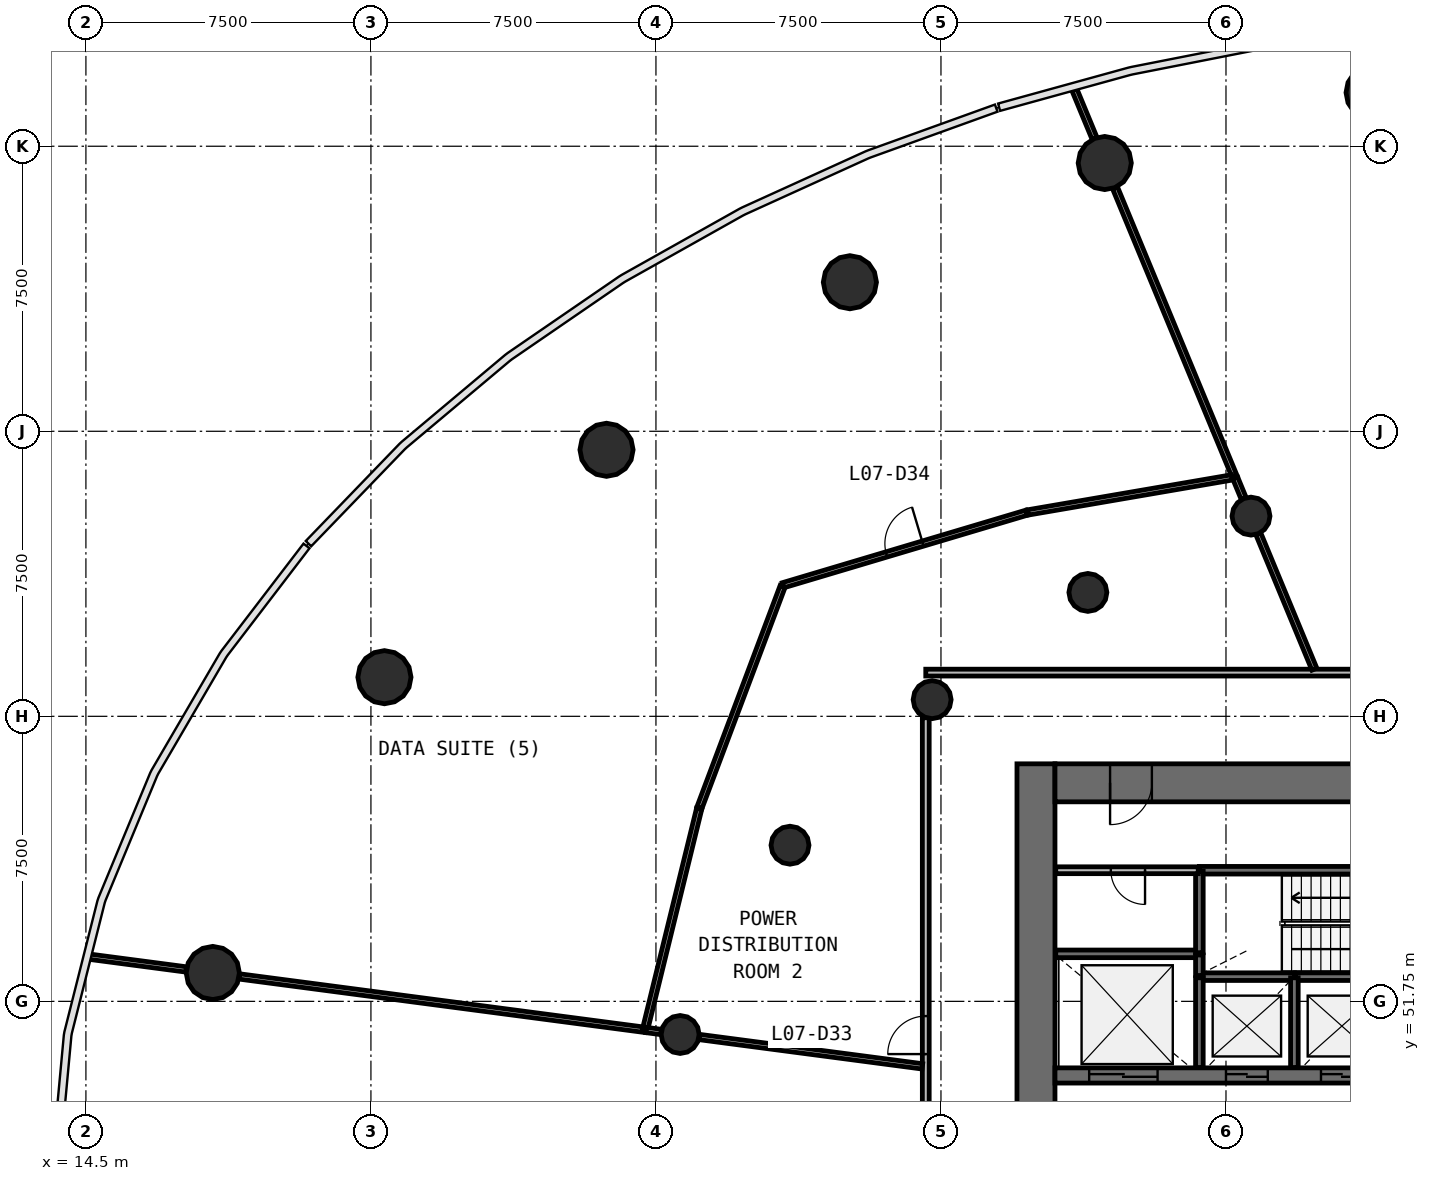
"""IFC4 building model, lengths in metres.
Left out: names, types, materials, properties, quantities, classifications, styles, units other than length and angle.
Written with IfcOpenShell. Run it as: python <this file> out.ifc"""

import sys

from ifc_helpers import new_model, si_unit, direction, frame, frame_2d, origin, origin_2d, place, context, subcontext, project, spatial, rectangle, circle, extrude, source, transform, mapped, element, fill, save


model = new_model("IFC4")
c1 = context("Model", 3, precision=1e-05, world=origin(), true_north=direction((0.0, 1.0)))
c2 = subcontext(c1, "Body", "Model", "MODEL_VIEW")
j1 = project(units=[si_unit("LENGTHUNIT", "METRE"), si_unit("PLANEANGLEUNIT", "RADIAN")], contexts=[c1])
p1 = place(None, origin())
s1 = spatial("IfcSite", under=j1, at=p1, CompositionType="ELEMENT")
p2 = place(p1, origin())
s2 = spatial("IfcBuilding", under=s1, at=p2, CompositionType="ELEMENT")
p3 = place(p2, frame((0.0, 0.0, 31.4)))
s3 = spatial("IfcBuildingStorey", under=s2, at=p3, CompositionType="ELEMENT", Elevation=31.4)
p4 = place(p3, frame((39.5, 58.0, 0.0), z_axis=(0.0, 0.0, 1.0), x_axis=(0.0, -1.0, 0.0)))
e1 = element("IfcWall", 1, at=p4, inside=s3, PredefinedType="SHEAR", context=c2, shape_type="SweptSolid", body=[
    extrude(rectangle(XDim=20.0, YDim=1.0, at=frame_2d((10.0, 0.0))), origin(), (0.0, 0.0, 1.0), 4.4),
])
p5 = place(p4, frame((9.1, 0.0, 0.0)))
e2 = element("IfcOpeningElement", 2, at=p5, cuts=e1, PredefinedType="OPENING", context=c2, shape_type="SweptSolid", body=[
    extrude(rectangle(XDim=1.8, YDim=2.1, at=frame_2d((0.9, 1.05))), frame((0.0, 0.51, 0.0), z_axis=(0.0, -1.0, 0.0), x_axis=(1.0, 0.0, 0.0)), (0.0, 0.0, 1.0), 1.02),
])
p6 = place(p3, frame((64.0, 57.5, 0.0), z_axis=(0.0, 0.0, 1.0), x_axis=(-1.0, 0.0, 0.0)))
e3 = element("IfcWall", 3, at=p6, inside=s3, PredefinedType="SHEAR", context=c2, shape_type="SweptSolid", body=[
    extrude(rectangle(XDim=24.0, YDim=1.0, at=frame_2d((12.0, 0.0))), origin(), (0.0, 0.0, 1.0), 4.4),
])
p7 = place(p6, frame((21.45, 0.0, 0.0)))
e4 = element("IfcOpeningElement", 4, at=p7, cuts=e3, PredefinedType="OPENING", context=c2, shape_type="SweptSolid", body=[
    extrude(rectangle(XDim=1.1, YDim=2.1, at=frame_2d((0.55, 1.05))), frame((0.0, 0.51, 0.0), z_axis=(0.0, -1.0, 0.0), x_axis=(1.0, 0.0, 0.0)), (0.0, 0.0, 1.0), 1.02),
])
p8 = place(p6, frame((1.95, 0.0, 0.0)))
e5 = element("IfcOpeningElement", 5, at=p8, cuts=e3, PredefinedType="OPENING", context=c2, shape_type="SweptSolid", body=[
    extrude(rectangle(XDim=1.1, YDim=2.1, at=frame_2d((0.55, 1.05))), frame((0.0, 0.51, 0.0), z_axis=(0.0, -1.0, 0.0), x_axis=(1.0, 0.0, 0.0)), (0.0, 0.0, 1.0), 1.02),
])
p9 = place(p3, frame((40.0, 49.8, 0.0), z_axis=(0.0, 0.0, 1.0), x_axis=(1.0, 0.0, 0.0)))
e6 = element("IfcWall", 6, at=p9, inside=s3, PredefinedType="SHEAR", context=c2, shape_type="SweptSolid", body=[
    extrude(rectangle(XDim=24.0, YDim=0.4, at=frame_2d((12.0, 0.0))), origin(), (0.0, 0.0, 1.0), 4.4),
])
p10 = place(p9, frame((4.5, 0.0, 0.0)))
e7 = element("IfcOpeningElement", 7, at=p10, cuts=e6, PredefinedType="OPENING", context=c2, shape_type="SweptSolid", body=[
    extrude(rectangle(XDim=1.1, YDim=2.1, at=frame_2d((0.55, 1.05))), frame((0.0, 0.21, 0.0), z_axis=(0.0, -1.0, 0.0), x_axis=(1.0, 0.0, 0.0)), (0.0, 0.0, 1.0), 0.42),
])
p11 = place(p9, frame((7.0, 0.0, 0.0)))
e8 = element("IfcOpeningElement", 8, at=p11, cuts=e6, PredefinedType="OPENING", context=c2, shape_type="SweptSolid", body=[
    extrude(rectangle(XDim=1.1, YDim=2.1, at=frame_2d((0.55, 1.05))), frame((0.0, 0.21, 0.0), z_axis=(0.0, -1.0, 0.0), x_axis=(1.0, 0.0, 0.0)), (0.0, 0.0, 1.0), 0.42),
])
p12 = place(p9, frame((9.5, 0.0, 0.0)))
e9 = element("IfcOpeningElement", 9, at=p12, cuts=e6, PredefinedType="OPENING", context=c2, shape_type="SweptSolid", body=[
    extrude(rectangle(XDim=1.1, YDim=2.1, at=frame_2d((0.55, 1.05))), frame((0.0, 0.21, 0.0), z_axis=(0.0, -1.0, 0.0), x_axis=(1.0, 0.0, 0.0)), (0.0, 0.0, 1.0), 0.42),
])
p13 = place(p9, frame((0.9, 0.0, 0.0)))
e10 = element("IfcOpeningElement", 10, at=p13, cuts=e6, PredefinedType="OPENING", context=c2, shape_type="SweptSolid", body=[
    extrude(rectangle(XDim=1.8, YDim=2.4, at=frame_2d((0.9, 1.2))), frame((0.0, 0.21, 0.0), z_axis=(0.0, -1.0, 0.0), x_axis=(1.0, 0.0, 0.0)), (0.0, 0.0, 1.0), 0.42),
])
p14 = place(p9, frame((20.45, 0.0, 0.0)))
e11 = element("IfcOpeningElement", 11, at=p14, cuts=e6, PredefinedType="OPENING", context=c2, shape_type="SweptSolid", body=[
    extrude(rectangle(XDim=0.9, YDim=2.1, at=frame_2d((0.45, 1.05))), frame((0.0, 0.21, 0.0), z_axis=(0.0, -1.0, 0.0), x_axis=(1.0, 0.0, 0.0)), (0.0, 0.0, 1.0), 0.42),
])
p15 = place(p9, frame((11.65, 0.0, 0.0)))
e12 = element("IfcOpeningElement", 12, at=p15, cuts=e6, PredefinedType="OPENING", context=c2, shape_type="SweptSolid", body=[
    extrude(rectangle(XDim=0.9, YDim=2.1, at=frame_2d((0.45, 1.05))), frame((0.0, 0.21, 0.0), z_axis=(0.0, -1.0, 0.0), x_axis=(1.0, 0.0, 0.0)), (0.0, 0.0, 1.0), 0.42),
])
m1 = source(origin(), c2, "Body", "SweptSolid", [
    extrude(circle(Radius=0.7, at=origin_2d()), origin(), (0.0, 0.0, 1.0), 4.4),
])
for number, where, z_axis, x_axis in (
    (13, (48.358, 75.661, 0.0), (0.0, 0.0, 1.0), (1.0, 0.0, 0.0)),
    (14, (41.31, 73.809, 0.0), (0.0, 0.0, 1.0), (1.0, 0.0, 0.0)),
    (15, (34.604, 70.672, 0.0), (0.0, 0.0, 1.0), (1.0, 0.0, 0.0)),
    (16, (28.199, 66.263, 0.0), (0.0, 0.0, 1.0), (1.0, 0.0, 0.0)),
    (17, (22.355, 60.279, 0.0), (0.0, 0.0, 1.0), (1.0, 0.0, 0.0)),
    (18, (17.839, 52.497, 0.0), (0.0, 0.0, 1.0), (1.0, 0.0, 0.0)),
):
    element("IfcColumn", number, at=place(p3, frame(where, z_axis=z_axis, x_axis=x_axis)), inside=s3, PredefinedType="COLUMN", context=c2, shape_type="MappedRepresentation", body=[
        mapped(m1, transform((0.0, 0.0, 0.0), scale=1.0)),
    ])
m2 = source(origin(), c2, "Body", "SweptSolid", [
    extrude(circle(Radius=0.5, at=origin_2d()), origin(), (0.0, 0.0, 1.0), 4.4),
])
for number, where, z_axis, x_axis in (
    (19, (45.158, 64.518, 0.0), (0.0, 0.0, 1.0), (1.0, 0.0, 0.0)),
    (20, (40.866, 62.51, 0.0), (0.0, 0.0, 1.0), (1.0, 0.0, 0.0)),
    (21, (36.768, 59.688, 0.0), (0.0, 0.0, 1.0), (1.0, 0.0, 0.0)),
    (22, (33.028, 55.859, 0.0), (0.0, 0.0, 1.0), (1.0, 0.0, 0.0)),
    (23, (30.137, 50.878, 0.0), (0.0, 0.0, 1.0), (1.0, 0.0, 0.0)),
):
    element("IfcColumn", number, at=place(p3, frame(where, z_axis=z_axis, x_axis=x_axis)), inside=s3, PredefinedType="COLUMN", context=c2, shape_type="MappedRepresentation", body=[
        mapped(m2, transform((0.0, 0.0, 0.0), scale=1.0)),
    ])
p16 = place(p3, frame((50.4, 55.2, 0.0), z_axis=(0.0, 0.0, 1.0), x_axis=(-1.0, 0.0, 0.0)))
e24 = element("IfcWall", 24, at=p16, inside=s3, PredefinedType="SOLIDWALL", context=c2, shape_type="SweptSolid", body=[
    extrude(rectangle(XDim=6.6, YDim=0.2, at=frame_2d((3.3, 0.0))), origin(), (0.0, 0.0, 1.0), 3.95),
])
p17 = place(p16, frame((0.3, 0.0, 0.0)))
e25 = element("IfcOpeningElement", 25, at=p17, cuts=e24, PredefinedType="OPENING", context=c2, shape_type="SweptSolid", body=[
    extrude(rectangle(XDim=1.2, YDim=2.1, at=frame_2d((0.6, 1.05))), frame((0.0, 0.11, 0.0), z_axis=(0.0, -1.0, 0.0), x_axis=(1.0, 0.0, 0.0)), (0.0, 0.0, 1.0), 0.22),
])
p18 = place(p3, frame((43.8, 53.0, 0.0), z_axis=(0.0, 0.0, 1.0), x_axis=(-1.0, 0.0, 0.0)))
e26 = element("IfcWall", 26, at=p18, inside=s3, PredefinedType="SOLIDWALL", context=c2, shape_type="SweptSolid", body=[
    extrude(rectangle(XDim=3.78, YDim=0.2, at=frame_2d((1.89, 0.0))), origin(), (0.0, 0.0, 1.0), 3.95),
])
p19 = place(p3, frame((46.3, 52.4, 0.0), z_axis=(0.0, 0.0, 1.0), x_axis=(-1.0, 0.0, 0.0)))
e27 = element("IfcWall", 27, at=p19, inside=s3, PredefinedType="SOLIDWALL", context=c2, shape_type="SweptSolid", body=[
    extrude(rectangle(XDim=2.5, YDim=0.2, at=frame_2d((1.25, 0.0))), origin(), (0.0, 0.0, 1.0), 3.95),
])
p20 = place(p3, frame((48.8, 52.4, 0.0), z_axis=(0.0, 0.0, 1.0), x_axis=(-1.0, 0.0, 0.0)))
e28 = element("IfcWall", 28, at=p20, inside=s3, PredefinedType="SOLIDWALL", context=c2, shape_type="SweptSolid", body=[
    extrude(rectangle(XDim=2.47, YDim=0.2, at=frame_2d((1.235, 0.0))), origin(), (0.0, 0.0, 1.0), 3.95),
])
for number, where, z_axis, x_axis in (
    (29, (43.8, 52.37, 0.0), (0.0, 0.0, 1.0), (0.0, -1.0, 0.0)),
    (30, (46.3, 50.01, 0.0), (0.0, 0.0, 1.0), (0.0, 1.0, 0.0)),
):
    element("IfcWall", number, at=place(p3, frame(where, z_axis=z_axis, x_axis=x_axis)), inside=s3, PredefinedType="SOLIDWALL", context=c2, shape_type="SweptSolid", body=[
        extrude(rectangle(XDim=2.36, YDim=0.2, at=frame_2d((1.18, 0.0))), origin(), (0.0, 0.0, 1.0), 3.95),
    ])
p21 = place(p3, frame((43.8, 55.17, 0.0), z_axis=(0.0, 0.0, 1.0), x_axis=(0.0, -1.0, 0.0)))
e31 = element("IfcWall", 31, at=p21, inside=s3, PredefinedType="SOLIDWALL", context=c2, shape_type="SweptSolid", body=[
    extrude(rectangle(XDim=2.14, YDim=0.2, at=frame_2d((1.07, 0.0))), origin(), (0.0, 0.0, 1.0), 3.95),
])
p22 = place(p3, frame((43.8, 52.43, 0.0), z_axis=(0.0, 0.0, 1.0), x_axis=(0.0, 1.0, 0.0)))
e32 = element("IfcWall", 32, at=p22, inside=s3, PredefinedType="SOLIDWALL", context=c2, shape_type="SweptSolid", body=[
    extrude(rectangle(XDim=0.54, YDim=0.2, at=frame_2d((0.27, 0.0))), origin(), (0.0, 0.0, 1.0), 3.95),
])
p23 = place(p3, frame((36.6, 60.4, 0.0), z_axis=(0.0, 0.0, 1.0), x_axis=(1.0, 0.0, 0.0)))
e33 = element("IfcWall", 33, at=p23, inside=s3, PredefinedType="PARTITIONING", context=c2, shape_type="SweptSolid", body=[
    extrude(rectangle(XDim=30.8, YDim=0.18, at=frame_2d((15.4, 0.0))), origin(), (0.0, 0.0, 1.0), 3.05),
])
p24 = place(p23, frame((20.95, 0.0, 0.0)))
e34 = element("IfcOpeningElement", 34, at=p24, cuts=e33, PredefinedType="OPENING", context=c2, shape_type="SweptSolid", body=[
    extrude(rectangle(XDim=1.0, YDim=2.1, at=frame_2d((0.5, 1.05))), frame((0.0, 0.1, 0.0), z_axis=(0.0, -1.0, 0.0), x_axis=(1.0, 0.0, 0.0)), (0.0, 0.0, 1.0), 0.2),
])
p25 = place(p23, frame((14.95, 0.0, 0.0)))
e35 = element("IfcOpeningElement", 35, at=p25, cuts=e33, PredefinedType="OPENING", context=c2, shape_type="SweptSolid", body=[
    extrude(rectangle(XDim=1.0, YDim=2.1, at=frame_2d((0.5, 1.05))), frame((0.0, 0.1, 0.0), z_axis=(0.0, -1.0, 0.0), x_axis=(1.0, 0.0, 0.0)), (0.0, 0.0, 1.0), 0.2),
])
p26 = place(p3, frame((36.6, 35.63, 0.0), z_axis=(0.0, 0.0, 1.0), x_axis=(0.0, 1.0, 0.0)))
e36 = element("IfcWall", 36, at=p26, inside=s3, PredefinedType="PARTITIONING", context=c2, shape_type="SweptSolid", body=[
    extrude(rectangle(XDim=23.583, YDim=0.18, at=frame_2d((11.791, 0.0))), origin(), (0.0, 0.0, 1.0), 3.05),
])
p27 = place(p26, frame((14.732, 0.0, 0.0)))
e37 = element("IfcOpeningElement", 37, at=p27, cuts=e36, PredefinedType="OPENING", context=c2, shape_type="SweptSolid", body=[
    extrude(rectangle(XDim=1.0, YDim=2.1, at=frame_2d((0.5, 1.05))), frame((0.0, 0.1, 0.0), z_axis=(0.0, -1.0, 0.0), x_axis=(1.0, 0.0, 0.0)), (0.0, 0.0, 1.0), 0.2),
])
p28 = place(p26, frame((11.333, 0.0, 0.0)))
e38 = element("IfcOpeningElement", 38, at=p28, cuts=e36, PredefinedType="OPENING", context=c2, shape_type="SweptSolid", body=[
    extrude(rectangle(XDim=1.0, YDim=2.1, at=frame_2d((0.5, 1.05))), frame((0.0, 0.1, 0.0), z_axis=(0.0, -1.0, 0.0), x_axis=(1.0, 0.0, 0.0)), (0.0, 0.0, 1.0), 0.2),
])
p29 = place(p26, frame((4.532, 0.0, 0.0)))
e39 = element("IfcOpeningElement", 39, at=p29, cuts=e36, PredefinedType="OPENING", context=c2, shape_type="SweptSolid", body=[
    extrude(rectangle(XDim=1.0, YDim=2.1, at=frame_2d((0.5, 1.05))), frame((0.0, 0.1, 0.0), z_axis=(0.0, -1.0, 0.0), x_axis=(1.0, 0.0, 0.0)), (0.0, 0.0, 1.0), 0.2),
])
p30 = place(p3, frame((43.77, 55.2, 0.0), z_axis=(0.0, 0.0, 1.0), x_axis=(-1.0, 0.0, 0.0)))
e40 = element("IfcWall", 40, at=p30, inside=s3, PredefinedType="PARTITIONING", context=c2, shape_type="SweptSolid", body=[
    extrude(rectangle(XDim=3.75, YDim=0.18, at=frame_2d((1.875, 0.0))), origin(), (0.0, 0.0, 1.0), 3.95),
])
p31 = place(p30, frame((1.4, 0.0, 0.0)))
e41 = element("IfcOpeningElement", 41, at=p31, cuts=e40, PredefinedType="OPENING", context=c2, shape_type="SweptSolid", body=[
    extrude(rectangle(XDim=0.9, YDim=2.1, at=frame_2d((0.45, 1.05))), frame((0.0, 0.1, 0.0), z_axis=(0.0, -1.0, 0.0), x_axis=(1.0, 0.0, 0.0)), (0.0, 0.0, 1.0), 0.2),
])
p32 = place(p3, frame((29.211, 51.0, 0.0), z_axis=(0.0, 0.0, 1.0), x_axis=(-0.991444412939, 0.130529598373, 0.0)))
e42 = element("IfcWall", 42, at=p32, inside=s3, PredefinedType="PARTITIONING", context=c2, shape_type="SweptSolid", body=[
    extrude(rectangle(XDim=10.766, YDim=0.14, at=frame_2d((5.383, 0.0))), origin(), (0.0, 0.0, 1.0), 3.05),
])
p33 = place(p3, frame((44.731, 65.549, 0.0), z_axis=(0.0, 0.0, 1.0), x_axis=(-0.382679959388, 0.923880971058, 0.0)))
e43 = element("IfcWall", 43, at=p33, inside=s3, PredefinedType="PARTITIONING", context=c2, shape_type="SweptSolid", body=[
    extrude(rectangle(XDim=8.235, YDim=0.14, at=frame_2d((4.118, 0.0))), origin(), (0.0, 0.0, 1.0), 3.05),
])
p34 = place(p3, frame((32.845, 62.698, 0.0), z_axis=(0.0, 0.0, 1.0), x_axis=(0.958354022352, 0.28558285635, 0.0)))
e44 = element("IfcWall", 44, at=p34, inside=s3, PredefinedType="PARTITIONING", context=c2, shape_type="SweptSolid", body=[
    extrude(rectangle(XDim=6.689, YDim=0.14, at=frame_2d((3.345, 0.0))), origin(), (0.0, 0.0, 1.0), 3.05),
])
p35 = place(p34, frame((2.84, 0.0, 0.0)))
e45 = element("IfcOpeningElement", 45, at=p35, cuts=e44, PredefinedType="OPENING", context=c2, shape_type="SweptSolid", body=[
    extrude(rectangle(XDim=1.0, YDim=2.1, at=frame_2d((0.5, 1.05))), frame((0.0, 0.08, 0.0), z_axis=(0.0, -1.0, 0.0), x_axis=(1.0, 0.0, 0.0)), (0.0, 0.0, 1.0), 0.16),
])
p36 = place(p3, frame((32.834, 62.67, 0.0), z_axis=(0.0, 0.0, 1.0), x_axis=(-0.351923028653, -0.936028942877, 0.0)))
e46 = element("IfcWall", 46, at=p36, inside=s3, PredefinedType="PARTITIONING", context=c2, shape_type="SweptSolid", body=[
    extrude(rectangle(XDim=6.223, YDim=0.14, at=frame_2d((3.111, 0.0))), origin(), (0.0, 0.0, 1.0), 3.05),
])
p37 = place(p3, frame((30.637, 56.817, 0.0), z_axis=(0.0, 0.0, 1.0), x_axis=(-0.238166110231, -0.97122443541, 0.0)))
e47 = element("IfcWall", 47, at=p37, inside=s3, PredefinedType="PARTITIONING", context=c2, shape_type="SweptSolid", body=[
    extrude(rectangle(XDim=5.959, YDim=0.14, at=frame_2d((2.979, 0.0))), origin(), (0.0, 0.0, 1.0), 3.05),
])
p38 = place(p3, frame((36.51, 50.039, 0.0), z_axis=(0.0, 0.0, 1.0), x_axis=(-0.991445034615, 0.130524876315, 0.0)))
e48 = element("IfcWall", 48, at=p38, inside=s3, PredefinedType="PARTITIONING", context=c2, shape_type="SweptSolid", body=[
    extrude(rectangle(XDim=5.924, YDim=0.14, at=frame_2d((2.962, 0.0))), origin(), (0.0, 0.0, 1.0), 3.05),
])
p39 = place(p3, frame((44.66, 65.537, 0.0), z_axis=(0.0, 0.0, 1.0), x_axis=(-0.985578769271, -0.169217285058, 0.0)))
e49 = element("IfcWall", 49, at=p39, inside=s3, PredefinedType="PARTITIONING", context=c2, shape_type="SweptSolid", body=[
    extrude(rectangle(XDim=5.454, YDim=0.14, at=frame_2d((2.727, 0.0))), origin(), (0.0, 0.0, 1.0), 3.05),
])
p40 = place(p3, frame((46.826, 60.49, 0.0), z_axis=(0.0, 0.0, 1.0), x_axis=(-0.382644558062, 0.923895633817, 0.0)))
e50 = element("IfcWall", 50, at=p40, inside=s3, PredefinedType="PARTITIONING", context=c2, shape_type="SweptSolid", body=[
    extrude(rectangle(XDim=3.854, YDim=0.14, at=frame_2d((1.927, 0.0))), origin(), (0.0, 0.0, 1.0), 3.05),
])
p41 = place(p3, frame((17.141, 52.589, 0.0), z_axis=(0.0, 0.0, 1.0), x_axis=(-0.991441410766, 0.130552399509, 0.0)))
e51 = element("IfcWall", 51, at=p41, inside=s3, PredefinedType="PARTITIONING", context=c2, shape_type="SweptSolid", body=[
    extrude(rectangle(XDim=2.581, YDim=0.14, at=frame_2d((1.29, 0.0))), origin(), (0.0, 0.0, 1.0), 3.05),
])
p42 = place(p3, frame((41.04, 74.46, 0.0), z_axis=(0.0, 0.0, 1.0), x_axis=(-0.382579541027, 0.923922558869, 0.0)))
e52 = element("IfcWall", 52, at=p42, inside=s3, PredefinedType="PARTITIONING", context=c2, shape_type="SweptSolid", body=[
    extrude(rectangle(XDim=1.389, YDim=0.14, at=frame_2d((0.694, 0.0))), origin(), (0.0, 0.0, 1.0), 3.05),
])
p43 = place(p3, frame((44.965, 64.984, 0.0), z_axis=(0.0, 0.0, 1.0), x_axis=(-0.382945109993, 0.923771098667, 0.0)))
e53 = element("IfcWall", 53, at=p43, inside=s3, PredefinedType="PARTITIONING", context=c2, shape_type="SweptSolid", body=[
    extrude(rectangle(XDim=0.582, YDim=0.14, at=frame_2d((0.291, 0.0))), origin(), (0.0, 0.0, 1.0), 3.05),
])
p44 = place(p3, frame((29.637, 50.944, 0.0), z_axis=(0.0, 0.0, 1.0), x_axis=(-0.991418913515, 0.130723134622, 0.0)))
e54 = element("IfcWall", 54, at=p44, inside=s3, PredefinedType="PARTITIONING", context=c2, shape_type="SweptSolid", body=[
    extrude(rectangle(XDim=0.4, YDim=0.14, at=frame_2d((0.2, 0.0))), origin(), (0.0, 0.0, 1.0), 3.05),
])
m3 = source(origin(), c2, "Body", "SweptSolid", [
    extrude(rectangle(XDim=1.1, YDim=2.1, at=frame_2d((0.55, 1.05))), frame((0.0, 0.025, 0.0), z_axis=(0.0, -1.0, 0.0), x_axis=(1.0, 0.0, 0.0)), (0.0, 0.0, 1.0), 0.05),
])
p45 = place(p10, origin())
e55 = element("IfcDoor", 55, at=p45, inside=s3, OperationType="DOUBLE_DOOR_SLIDING", PredefinedType="USERDEFINED", context=c2, shape_type="MappedRepresentation", body=[
    mapped(m3, transform((0.0, 0.0, 0.0), scale=1.0)),
])
fill(e7, e55)
p46 = place(p11, origin())
e56 = element("IfcDoor", 56, at=p46, inside=s3, OperationType="DOUBLE_DOOR_SLIDING", PredefinedType="USERDEFINED", context=c2, shape_type="MappedRepresentation", body=[
    mapped(m3, transform((0.0, 0.0, 0.0), scale=1.0)),
])
fill(e8, e56)
m4 = source(origin(), c2, "Body", "SweptSolid", [
    extrude(rectangle(XDim=1.8, YDim=2.4, at=frame_2d((0.9, 1.2))), frame((0.0, 0.025, 0.0), z_axis=(0.0, -1.0, 0.0), x_axis=(1.0, 0.0, 0.0)), (0.0, 0.0, 1.0), 0.05),
])
p47 = place(p13, origin())
e57 = element("IfcDoor", 57, at=p47, inside=s3, OperationType="DOUBLE_DOOR_SLIDING", PredefinedType="USERDEFINED", context=c2, shape_type="MappedRepresentation", body=[
    mapped(m4, transform((0.0, 0.0, 0.0), scale=1.0)),
])
fill(e10, e57)
m5 = source(origin(), c2, "Body", "SweptSolid", [
    extrude(rectangle(XDim=1.1, YDim=2.1, at=frame_2d((0.55, 1.05))), frame((0.0, 0.025, 0.0), z_axis=(0.0, -1.0, 0.0), x_axis=(1.0, 0.0, 0.0)), (0.0, 0.0, 1.0), 0.05),
])
p48 = place(p7, origin())
e58 = element("IfcDoor", 58, at=p48, inside=s3, OperationType="SINGLE_SWING_RIGHT", PredefinedType="DOOR", context=c2, shape_type="MappedRepresentation", body=[
    mapped(m5, transform((0.0, 0.0, 0.0), scale=1.0)),
])
fill(e4, e58)
m6 = source(origin(), c2, "Body", "SweptSolid", [
    extrude(rectangle(XDim=1.0, YDim=2.1, at=frame_2d((0.5, 1.05))), frame((0.0, 0.025, 0.0), z_axis=(0.0, -1.0, 0.0), x_axis=(1.0, 0.0, 0.0)), (0.0, 0.0, 1.0), 0.05),
])
p49 = place(p27, origin())
e59 = element("IfcDoor", 59, at=p49, inside=s3, OperationType="SINGLE_SWING_LEFT", PredefinedType="DOOR", context=c2, shape_type="MappedRepresentation", body=[
    mapped(m6, transform((0.0, 0.0, 0.0), scale=1.0)),
])
fill(e37, e59)
p50 = place(p35, origin())
e60 = element("IfcDoor", 60, at=p50, inside=s3, OperationType="SINGLE_SWING_RIGHT", PredefinedType="DOOR", context=c2, shape_type="MappedRepresentation", body=[
    mapped(m6, transform((0.0, 0.0, 0.0), scale=1.0)),
])
fill(e45, e60)
m7 = source(origin(), c2, "Body", "SweptSolid", [
    extrude(rectangle(XDim=0.9, YDim=2.1, at=frame_2d((0.45, 1.05))), frame((0.0, 0.025, 0.0), z_axis=(0.0, -1.0, 0.0), x_axis=(1.0, 0.0, 0.0)), (0.0, 0.0, 1.0), 0.05),
])
p51 = place(p31, origin())
e61 = element("IfcDoor", 61, at=p51, inside=s3, OperationType="SINGLE_SWING_LEFT", PredefinedType="DOOR", context=c2, shape_type="MappedRepresentation", body=[
    mapped(m7, transform((0.0, 0.0, 0.0), scale=1.0)),
])
fill(e41, e61)
save(model, sys.argv[1])
